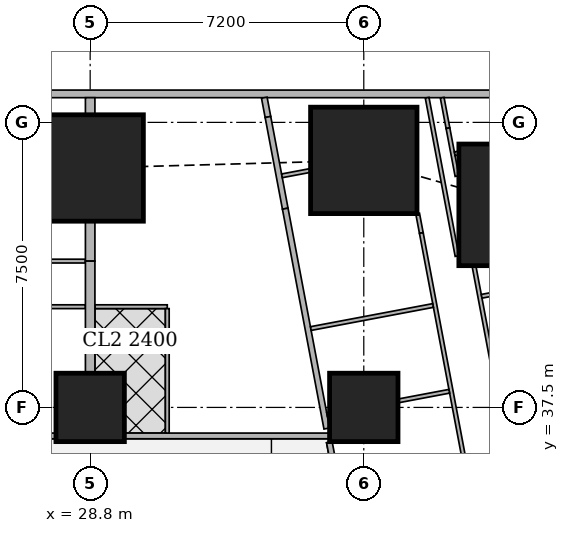
"""IFC4 building model, lengths in metres.
Left out: names, types, materials, properties, quantities, classifications, styles, units other than length and angle.
Written with IfcOpenShell. Run it as: python <this file> out.ifc"""

import sys

from ifc_helpers import new_model, si_unit, direction, frame, frame_2d, origin, origin_2d, place, context, subcontext, project, spatial, rectangle, extrude, element, fill, save


model = new_model("IFC4")
c1 = context("Model", 3, precision=1e-05, world=origin(), true_north=direction((0.0, 1.0)))
c2 = subcontext(c1, "Body", "Model", "MODEL_VIEW")
j1 = project(units=[si_unit("LENGTHUNIT", "METRE"), si_unit("PLANEANGLEUNIT", "RADIAN")], contexts=[c1])
p1 = place(None, origin())
s1 = spatial("IfcSite", under=j1, at=p1, CompositionType="ELEMENT")
p2 = place(p1, origin())
s2 = spatial("IfcBuilding", under=s1, at=p2, CompositionType="ELEMENT")
p3 = place(p2, frame((0.0, 0.0, 53.75)))
s3 = spatial("IfcBuildingStorey", under=s2, at=p3, CompositionType="ELEMENT", Elevation=53.75)
for number, where, z_axis, x_axis in (
    (1, (28.8, 37.5, 0.0), (0.0, 0.0, 1.0), (1.0, 0.0, 0.0)),
    (2, (36.0, 37.5, 0.0), (0.0, 0.0, 1.0), (1.0, 0.0, 0.0)),
):
    element("IfcColumn", number, at=place(p3, frame(where, z_axis=z_axis, x_axis=x_axis)), inside=s3, PredefinedType="COLUMN", context=c2, shape_type="SweptSolid", body=[
        extrude(rectangle(XDim=1.8, YDim=1.8, at=origin_2d()), origin(), (0.0, 0.0, 1.0), 3.75),
    ])
p4 = place(p3, frame((40.102, 42.83, 0.0), z_axis=(0.0, 0.0, 1.0), x_axis=(1.0, 0.0, 0.0)))
e3 = element("IfcColumn", 3, at=p4, inside=s3, PredefinedType="COLUMN", context=c2, shape_type="SweptSolid", body=[
    extrude(rectangle(XDim=3.2, YDim=3.2, at=origin_2d()), origin(), (0.0, 0.0, 1.0), 3.75),
])
for number, where, z_axis, x_axis in (
    (4, (28.8, 43.8, 0.0), (0.0, 0.0, 1.0), (1.0, 0.0, 0.0)),
    (5, (36.0, 44.0, 0.0), (0.0, 0.0, 1.0), (1.0, 0.0, 0.0)),
):
    element("IfcColumn", number, at=place(p3, frame(where, z_axis=z_axis, x_axis=x_axis)), inside=s3, PredefinedType="COLUMN", context=c2, shape_type="SweptSolid", body=[
        extrude(rectangle(XDim=2.8, YDim=2.8, at=origin_2d()), origin(), (0.0, 0.0, 1.0), 3.75),
    ])
p5 = place(p3, frame((40.106, 45.75, 0.0), z_axis=(0.0, 0.0, 1.0), x_axis=(-1.0, 0.0, 0.0)))
e6 = element("IfcWall", 6, at=p5, inside=s3, PredefinedType="SOLIDWALL", context=c2, shape_type="SweptSolid", body=[
    extrude(rectangle(XDim=37.943, YDim=0.2, at=frame_2d((18.971, 0.0))), origin(), (0.0, 0.0, 1.0), 3.5),
])
p6 = place(p5, frame((8.606, 0.0, 0.9)))
e7 = element("IfcOpeningElement", 7, at=p6, cuts=e6, PredefinedType="OPENING", context=c2, shape_type="SweptSolid", body=[
    extrude(rectangle(XDim=1.8, YDim=1.5, at=frame_2d((0.9, 0.75))), frame((0.0, 0.11, 0.0), z_axis=(0.0, -1.0, 0.0), x_axis=(1.0, 0.0, 0.0)), (0.0, 0.0, 1.0), 0.22),
])
p7 = place(p5, frame((12.206, 0.0, 0.9)))
e8 = element("IfcOpeningElement", 8, at=p7, cuts=e6, PredefinedType="OPENING", context=c2, shape_type="SweptSolid", body=[
    extrude(rectangle(XDim=1.8, YDim=1.5, at=frame_2d((0.9, 0.75))), frame((0.0, 0.11, 0.0), z_axis=(0.0, -1.0, 0.0), x_axis=(1.0, 0.0, 0.0)), (0.0, 0.0, 1.0), 0.22),
])
p8 = place(p5, frame((15.806, 0.0, 0.9)))
e9 = element("IfcOpeningElement", 9, at=p8, cuts=e6, PredefinedType="OPENING", context=c2, shape_type="SweptSolid", body=[
    extrude(rectangle(XDim=1.8, YDim=1.5, at=frame_2d((0.9, 0.75))), frame((0.0, 0.11, 0.0), z_axis=(0.0, -1.0, 0.0), x_axis=(1.0, 0.0, 0.0)), (0.0, 0.0, 1.0), 0.22),
])
p9 = place(p5, frame((19.406, 0.0, 0.9)))
e10 = element("IfcOpeningElement", 10, at=p9, cuts=e6, PredefinedType="OPENING", context=c2, shape_type="SweptSolid", body=[
    extrude(rectangle(XDim=1.8, YDim=1.5, at=frame_2d((0.9, 0.75))), frame((0.0, 0.11, 0.0), z_axis=(0.0, -1.0, 0.0), x_axis=(1.0, 0.0, 0.0)), (0.0, 0.0, 1.0), 0.22),
])
p10 = place(p5, frame((23.006, 0.0, 0.9)))
e11 = element("IfcOpeningElement", 11, at=p10, cuts=e6, PredefinedType="OPENING", context=c2, shape_type="SweptSolid", body=[
    extrude(rectangle(XDim=1.8, YDim=1.5, at=frame_2d((0.9, 0.75))), frame((0.0, 0.11, 0.0), z_axis=(0.0, -1.0, 0.0), x_axis=(1.0, 0.0, 0.0)), (0.0, 0.0, 1.0), 0.22),
])
p11 = place(p5, frame((26.606, 0.0, 0.9)))
e12 = element("IfcOpeningElement", 12, at=p11, cuts=e6, PredefinedType="OPENING", context=c2, shape_type="SweptSolid", body=[
    extrude(rectangle(XDim=1.8, YDim=1.5, at=frame_2d((0.9, 0.75))), frame((0.0, 0.11, 0.0), z_axis=(0.0, -1.0, 0.0), x_axis=(1.0, 0.0, 0.0)), (0.0, 0.0, 1.0), 0.22),
])
p12 = place(p3, frame((22.501, 36.75, 0.0), z_axis=(0.0, 0.0, 1.0), x_axis=(1.0, 0.0, 0.0)))
e13 = element("IfcWall", 13, at=p12, inside=s3, PredefinedType="SOLIDWALL", context=c2, shape_type="SweptSolid", body=[
    extrude(rectangle(XDim=5.398, YDim=0.15, at=frame_2d((2.699, 0.0))), origin(), (0.0, 0.0, 1.0), 3.5),
])
p13 = place(p3, frame((29.701, 36.75, 0.0), z_axis=(0.0, 0.0, 1.0), x_axis=(1.0, 0.0, 0.0)))
e14 = element("IfcWall", 14, at=p13, inside=s3, PredefinedType="SOLIDWALL", context=c2, shape_type="SweptSolid", body=[
    extrude(rectangle(XDim=5.399, YDim=0.15, at=frame_2d((2.7, 0.0))), origin(), (0.0, 0.0, 1.0), 3.5),
])
p14 = place(p13, frame((2.745, 0.0, 0.0)))
e15 = element("IfcOpeningElement", 15, at=p14, cuts=e14, PredefinedType="OPENING", context=c2, shape_type="SweptSolid", body=[
    extrude(rectangle(XDim=1.0, YDim=2.1, at=frame_2d((0.5, 1.05))), frame((0.0, 0.085, 0.0), z_axis=(0.0, -1.0, 0.0), x_axis=(1.0, 0.0, 0.0)), (0.0, 0.0, 1.0), 0.17),
])
p15 = place(p3, frame((33.382, 45.65, 0.0), z_axis=(0.0, 0.0, 1.0), x_axis=(0.185657456326, -0.982614527122, 0.0)))
e16 = element("IfcWall", 16, at=p15, inside=s3, PredefinedType="SOLIDWALL", context=c2, shape_type="SweptSolid", body=[
    extrude(rectangle(XDim=0.517, YDim=0.15, at=frame_2d((0.258, 0.0))), origin(), (0.0, 0.0, 1.0), 3.5),
])
p16 = place(p3, frame((33.478, 45.142, 0.0), z_axis=(0.0, 0.0, 1.0), x_axis=(0.185393362436, -0.982664388876, 0.0)))
e17 = element("IfcWall", 17, at=p16, inside=s3, PredefinedType="SOLIDWALL", context=c2, shape_type="SweptSolid", body=[
    extrude(rectangle(XDim=2.455, YDim=0.15, at=frame_2d((1.227, 0.0))), origin(), (0.0, 0.0, 1.0), 2.05),
])
p17 = place(p3, frame((33.933, 42.73, 0.0), z_axis=(0.0, 0.0, 1.0), x_axis=(0.185617897238, -0.982622000682, 0.0)))
e18 = element("IfcWall", 18, at=p17, inside=s3, PredefinedType="SOLIDWALL", context=c2, shape_type="SweptSolid", body=[
    extrude(rectangle(XDim=5.887, YDim=0.15, at=frame_2d((2.944, 0.0))), origin(), (0.0, 0.0, 1.0), 3.5),
])
p18 = place(p3, frame((35.094, 36.585, 0.0), z_axis=(0.0, 0.0, 1.0), x_axis=(0.185588860311, -0.982627485331, 0.0)))
e19 = element("IfcWall", 19, at=p18, inside=s3, PredefinedType="SOLIDWALL", context=c2, shape_type="SweptSolid", body=[
    extrude(rectangle(XDim=34.797, YDim=0.15, at=frame_2d((17.399, 0.0))), origin(), (0.0, 0.0, 1.0), 2.5),
])
p19 = place(p18, frame((9.828, 0.0, 0.0)))
e20 = element("IfcOpeningElement", 20, at=p19, cuts=e19, PredefinedType="OPENING", context=c2, shape_type="SweptSolid", body=[
    extrude(rectangle(XDim=1.0, YDim=2.1, at=frame_2d((0.5, 1.05))), frame((0.0, 0.085, 0.0), z_axis=(0.0, -1.0, 0.0), x_axis=(1.0, 0.0, 0.0)), (0.0, 0.0, 1.0), 0.17),
])
p20 = place(p18, frame((13.645, 0.0, 0.0)))
e21 = element("IfcOpeningElement", 21, at=p20, cuts=e19, PredefinedType="OPENING", context=c2, shape_type="SweptSolid", body=[
    extrude(rectangle(XDim=1.0, YDim=2.1, at=frame_2d((0.5, 1.05))), frame((0.0, 0.085, 0.0), z_axis=(0.0, -1.0, 0.0), x_axis=(1.0, 0.0, 0.0)), (0.0, 0.0, 1.0), 0.17),
])
p21 = place(p18, frame((25.9, 0.0, 0.0)))
e22 = element("IfcOpeningElement", 22, at=p21, cuts=e19, PredefinedType="OPENING", context=c2, shape_type="SweptSolid", body=[
    extrude(rectangle(XDim=1.0, YDim=2.1, at=frame_2d((0.5, 1.05))), frame((0.0, 0.085, 0.0), z_axis=(0.0, -1.0, 0.0), x_axis=(1.0, 0.0, 0.0)), (0.0, 0.0, 1.0), 0.17),
])
p22 = place(p3, frame((38.454, 41.483, 0.0), z_axis=(0.0, 0.0, 1.0), x_axis=(-0.185609245326, 0.982623634994, 0.0)))
e23 = element("IfcWall", 23, at=p22, inside=s3, PredefinedType="PARTITIONING", context=c2, shape_type="SweptSolid", body=[
    extrude(rectangle(XDim=4.241, YDim=0.1, at=frame_2d((2.12, 0.0))), origin(), (0.0, 0.0, 1.0), 2.05),
])
p23 = place(p3, frame((38.063, 45.65, 0.0), z_axis=(0.0, 0.0, 1.0), x_axis=(0.186109918919, -0.982528929895, 0.0)))
e24 = element("IfcWall", 24, at=p23, inside=s3, PredefinedType="PARTITIONING", context=c2, shape_type="SweptSolid", body=[
    extrude(rectangle(XDim=0.817, YDim=0.1, at=frame_2d((0.409, 0.0))), origin(), (0.0, 0.0, 1.0), 3.5),
])
p24 = place(p3, frame((38.215, 44.847, 0.0), z_axis=(0.0, 0.0, 1.0), x_axis=(0.185449486507, -0.982653798626, 0.0)))
e25 = element("IfcWall", 25, at=p24, inside=s3, PredefinedType="PARTITIONING", context=c2, shape_type="SweptSolid", body=[
    extrude(rectangle(XDim=1.282, YDim=0.1, at=frame_2d((0.641, 0.0))), origin(), (0.0, 0.0, 1.0), 2.05),
])
p25 = place(p3, frame((38.9, 41.22, 0.0), z_axis=(0.0, 0.0, 1.0), x_axis=(0.185521843026, -0.98264014052, 0.0)))
e26 = element("IfcWall", 26, at=p25, inside=s3, PredefinedType="PARTITIONING", context=c2, shape_type="SweptSolid", body=[
    extrude(rectangle(XDim=12.058, YDim=0.1, at=frame_2d((6.029, 0.0))), origin(), (0.0, 0.0, 1.0), 2.5),
])
p26 = place(p25, frame((9.55, 0.0, 0.0)))
e27 = element("IfcOpeningElement", 27, at=p26, cuts=e26, PredefinedType="OPENING", context=c2, shape_type="SweptSolid", body=[
    extrude(rectangle(XDim=0.9, YDim=2.1, at=frame_2d((0.45, 1.05))), frame((0.0, 0.06, 0.0), z_axis=(0.0, -1.0, 0.0), x_axis=(1.0, 0.0, 0.0)), (0.0, 0.0, 1.0), 0.12),
])
p27 = place(p25, frame((7.352, 0.0, 0.0)))
e28 = element("IfcOpeningElement", 28, at=p27, cuts=e26, PredefinedType="OPENING", context=c2, shape_type="SweptSolid", body=[
    extrude(rectangle(XDim=0.9, YDim=2.1, at=frame_2d((0.45, 1.05))), frame((0.0, 0.06, 0.0), z_axis=(0.0, -1.0, 0.0), x_axis=(1.0, 0.0, 0.0)), (0.0, 0.0, 1.0), 0.12),
])
p28 = place(p25, frame((1.9, 0.0, 0.0)))
e29 = element("IfcOpeningElement", 29, at=p28, cuts=e26, PredefinedType="OPENING", context=c2, shape_type="SweptSolid", body=[
    extrude(rectangle(XDim=0.9, YDim=2.1, at=frame_2d((0.45, 1.05))), frame((0.0, 0.06, 0.0), z_axis=(0.0, -1.0, 0.0), x_axis=(1.0, 0.0, 0.0)), (0.0, 0.0, 1.0), 0.12),
])
p29 = place(p3, frame((37.417, 42.602, 0.0), z_axis=(0.0, 0.0, 1.0), x_axis=(0.185672001976, -0.982611778721, 0.0)))
e30 = element("IfcWall", 30, at=p29, inside=s3, PredefinedType="PARTITIONING", context=c2, shape_type="SweptSolid", body=[
    extrude(rectangle(XDim=0.522, YDim=0.1, at=frame_2d((0.261, 0.0))), origin(), (0.0, 0.0, 1.0), 2.05),
])
p30 = place(p3, frame((37.514, 42.089, 0.0), z_axis=(0.0, 0.0, 1.0), x_axis=(0.1856087397, -0.982623730503, 0.0)))
e31 = element("IfcWall", 31, at=p30, inside=s3, PredefinedType="PARTITIONING", context=c2, shape_type="SweptSolid", body=[
    extrude(rectangle(XDim=13.33, YDim=0.1, at=frame_2d((6.665, 0.0))), origin(), (0.0, 0.0, 1.0), 2.5),
])
p31 = place(p30, frame((11.825, 0.0, 0.0)))
e32 = element("IfcOpeningElement", 32, at=p31, cuts=e31, PredefinedType="OPENING", context=c2, shape_type="SweptSolid", body=[
    extrude(rectangle(XDim=0.9, YDim=2.1, at=frame_2d((0.45, 1.05))), frame((0.0, 0.06, 0.0), z_axis=(0.0, -1.0, 0.0), x_axis=(1.0, 0.0, 0.0)), (0.0, 0.0, 1.0), 0.12),
])
p32 = place(p30, frame((8.203, 0.0, 0.0)))
e33 = element("IfcOpeningElement", 33, at=p32, cuts=e31, PredefinedType="OPENING", context=c2, shape_type="SweptSolid", body=[
    extrude(rectangle(XDim=0.9, YDim=2.1, at=frame_2d((0.45, 1.05))), frame((0.0, 0.06, 0.0), z_axis=(0.0, -1.0, 0.0), x_axis=(1.0, 0.0, 0.0)), (0.0, 0.0, 1.0), 0.12),
])
p33 = place(p30, frame((2.63, 0.0, 0.0)))
e34 = element("IfcOpeningElement", 34, at=p33, cuts=e31, PredefinedType="OPENING", context=c2, shape_type="SweptSolid", body=[
    extrude(rectangle(XDim=0.9, YDim=2.1, at=frame_2d((0.45, 1.05))), frame((0.0, 0.06, 0.0), z_axis=(0.0, -1.0, 0.0), x_axis=(1.0, 0.0, 0.0)), (0.0, 0.0, 1.0), 0.12),
])
p34 = place(p30, frame((9.916, 0.0, 0.0)))
e35 = element("IfcOpeningElement", 35, at=p34, cuts=e31, PredefinedType="OPENING", context=c2, shape_type="SweptSolid", body=[
    extrude(rectangle(XDim=0.9, YDim=2.1, at=frame_2d((0.45, 1.05))), frame((0.0, 0.06, 0.0), z_axis=(0.0, -1.0, 0.0), x_axis=(1.0, 0.0, 0.0)), (0.0, 0.0, 1.0), 0.12),
])
p35 = place(p30, frame((5.535, 0.0, 0.0)))
e36 = element("IfcOpeningElement", 36, at=p35, cuts=e31, PredefinedType="OPENING", context=c2, shape_type="SweptSolid", body=[
    extrude(rectangle(XDim=0.9, YDim=2.1, at=frame_2d((0.45, 1.05))), frame((0.0, 0.06, 0.0), z_axis=(0.0, -1.0, 0.0), x_axis=(1.0, 0.0, 0.0)), (0.0, 0.0, 1.0), 0.12),
])
p36 = place(p3, frame((38.492, 44.193, 0.0), z_axis=(0.0, 0.0, 1.0), x_axis=(-0.981954528773, -0.189117168504, 0.0)))
e37 = element("IfcWall", 37, at=p36, inside=s3, PredefinedType="PARTITIONING", context=c2, shape_type="SweptSolid", body=[
    extrude(rectangle(XDim=0.101, YDim=0.1, at=frame_2d((0.05, 0.0))), origin(), (0.0, 0.0, 1.0), 2.05),
])
p37 = place(p3, frame((43.277, 41.212, 0.0), z_axis=(0.0, 0.0, 1.0), x_axis=(-0.982665405803, -0.185387972203, 0.0)))
e38 = element("IfcWall", 38, at=p37, inside=s3, PredefinedType="PARTITIONING", context=c2, shape_type="SweptSolid", body=[
    extrude(rectangle(XDim=4.25, YDim=0.1, at=frame_2d((2.125, 0.0))), origin(), (0.0, 0.0, 1.0), 2.05),
])
p38 = place(p3, frame((34.59, 43.734, 0.0), z_axis=(0.0, 0.0, 1.0), x_axis=(-0.98274036184, -0.184990219229, 0.0)))
e39 = element("IfcWall", 39, at=p38, inside=s3, PredefinedType="PARTITIONING", context=c2, shape_type="SweptSolid", body=[
    extrude(rectangle(XDim=0.756, YDim=0.1, at=frame_2d((0.378, 0.0))), origin(), (0.0, 0.0, 1.0), 2.05),
])
p39 = place(p3, frame((37.823, 40.182, 0.0), z_axis=(0.0, 0.0, 1.0), x_axis=(-0.982664729897, -0.18539155487, 0.0)))
e40 = element("IfcWall", 40, at=p39, inside=s3, PredefinedType="PARTITIONING", context=c2, shape_type="SweptSolid", body=[
    extrude(rectangle(XDim=3.274, YDim=0.1, at=frame_2d((1.637, 0.0))), origin(), (0.0, 0.0, 1.0), 3.5),
])
p40 = place(p3, frame((38.25, 37.925, 0.0), z_axis=(0.0, 0.0, 1.0), x_axis=(-0.982650574676, -0.185466568658, 0.0)))
e41 = element("IfcWall", 41, at=p40, inside=s3, PredefinedType="PARTITIONING", context=c2, shape_type="SweptSolid", body=[
    extrude(rectangle(XDim=1.364, YDim=0.1, at=frame_2d((0.682, 0.0))), origin(), (0.0, 0.0, 1.0), 3.5),
])
p41 = place(p3, frame((35.09, 37.328, 0.0), z_axis=(0.0, 0.0, 1.0), x_axis=(-0.982590620415, -0.185783940835, 0.0)))
e42 = element("IfcWall", 42, at=p41, inside=s3, PredefinedType="PARTITIONING", context=c2, shape_type="SweptSolid", body=[
    extrude(rectangle(XDim=0.059, YDim=0.1, at=frame_2d((0.03, 0.0))), origin(), (0.0, 0.0, 1.0), 3.5),
])
p42 = place(p3, frame((21.6, 41.35, 0.0), z_axis=(0.0, 0.0, 1.0), x_axis=(1.0, 0.0, 0.0)))
e43 = element("IfcWall", 43, at=p42, inside=s3, PredefinedType="PARTITIONING", context=c2, shape_type="SweptSolid", body=[
    extrude(rectangle(XDim=7.075, YDim=0.1, at=frame_2d((3.538, 0.0))), origin(), (0.0, 0.0, 1.0), 3.5),
])
p43 = place(p42, frame((1.45, 0.0, 0.0)))
e44 = element("IfcOpeningElement", 44, at=p43, cuts=e43, PredefinedType="OPENING", context=c2, shape_type="SweptSolid", body=[
    extrude(rectangle(XDim=0.9, YDim=2.1, at=frame_2d((0.45, 1.05))), frame((0.0, 0.06, 0.0), z_axis=(0.0, -1.0, 0.0), x_axis=(1.0, 0.0, 0.0)), (0.0, 0.0, 1.0), 0.12),
])
p44 = place(p42, frame((3.8, 0.0, 0.0)))
e45 = element("IfcOpeningElement", 45, at=p44, cuts=e43, PredefinedType="OPENING", context=c2, shape_type="SweptSolid", body=[
    extrude(rectangle(XDim=0.9, YDim=2.1, at=frame_2d((0.45, 1.05))), frame((0.0, 0.06, 0.0), z_axis=(0.0, -1.0, 0.0), x_axis=(1.0, 0.0, 0.0)), (0.0, 0.0, 1.0), 0.12),
])
p45 = place(p3, frame((21.6, 40.15, 0.0), z_axis=(0.0, 0.0, 1.0), x_axis=(1.0, 0.0, 0.0)))
e46 = element("IfcWall", 46, at=p45, inside=s3, PredefinedType="PARTITIONING", context=c2, shape_type="SweptSolid", body=[
    extrude(rectangle(XDim=7.075, YDim=0.1, at=frame_2d((3.538, 0.0))), origin(), (0.0, 0.0, 1.0), 3.5),
])
p46 = place(p45, frame((0.655, 0.0, 0.0)))
e47 = element("IfcOpeningElement", 47, at=p46, cuts=e46, PredefinedType="OPENING", context=c2, shape_type="SweptSolid", body=[
    extrude(rectangle(XDim=0.9, YDim=2.1, at=frame_2d((0.45, 1.05))), frame((0.0, 0.06, 0.0), z_axis=(0.0, -1.0, 0.0), x_axis=(1.0, 0.0, 0.0)), (0.0, 0.0, 1.0), 0.12),
])
p47 = place(p45, frame((3.95, 0.0, 0.0)))
e48 = element("IfcOpeningElement", 48, at=p47, cuts=e46, PredefinedType="OPENING", context=c2, shape_type="SweptSolid", body=[
    extrude(rectangle(XDim=0.9, YDim=2.1, at=frame_2d((0.45, 1.05))), frame((0.0, 0.06, 0.0), z_axis=(0.0, -1.0, 0.0), x_axis=(1.0, 0.0, 0.0)), (0.0, 0.0, 1.0), 0.12),
])
p48 = place(p45, frame((2.455, 0.0, 0.0)))
e49 = element("IfcOpeningElement", 49, at=p48, cuts=e46, PredefinedType="OPENING", context=c2, shape_type="SweptSolid", body=[
    extrude(rectangle(XDim=0.9, YDim=2.1, at=frame_2d((0.45, 1.05))), frame((0.0, 0.06, 0.0), z_axis=(0.0, -1.0, 0.0), x_axis=(1.0, 0.0, 0.0)), (0.0, 0.0, 1.0), 0.12),
])
p49 = place(p45, frame((5.75, 0.0, 0.0)))
e50 = element("IfcOpeningElement", 50, at=p49, cuts=e46, PredefinedType="OPENING", context=c2, shape_type="SweptSolid", body=[
    extrude(rectangle(XDim=0.9, YDim=2.1, at=frame_2d((0.45, 1.05))), frame((0.0, 0.06, 0.0), z_axis=(0.0, -1.0, 0.0), x_axis=(1.0, 0.0, 0.0)), (0.0, 0.0, 1.0), 0.12),
])
p50 = place(p3, frame((28.925, 40.15, 0.0), z_axis=(0.0, 0.0, 1.0), x_axis=(1.0, 0.0, 0.0)))
e51 = element("IfcWall", 51, at=p50, inside=s3, PredefinedType="PARTITIONING", context=c2, shape_type="SweptSolid", body=[
    extrude(rectangle(XDim=1.904, YDim=0.1, at=frame_2d((0.952, 0.0))), origin(), (0.0, 0.0, 1.0), 3.5),
])
p51 = place(p50, frame((0.425, 0.0, 0.0)))
e52 = element("IfcOpeningElement", 52, at=p51, cuts=e51, PredefinedType="OPENING", context=c2, shape_type="SweptSolid", body=[
    extrude(rectangle(XDim=0.9, YDim=2.1, at=frame_2d((0.45, 1.05))), frame((0.0, 0.06, 0.0), z_axis=(0.0, -1.0, 0.0), x_axis=(1.0, 0.0, 0.0)), (0.0, 0.0, 1.0), 0.12),
])
p52 = place(p3, frame((30.829, 36.825, 0.0), z_axis=(0.0, 0.0, 1.0), x_axis=(0.0, 1.0, 0.0)))
e53 = element("IfcWall", 53, at=p52, inside=s3, PredefinedType="PARTITIONING", context=c2, shape_type="SweptSolid", body=[
    extrude(rectangle(XDim=3.275, YDim=0.1, at=frame_2d((1.638, 0.0))), origin(), (0.0, 0.0, 1.0), 3.5),
])
p53 = place(p3, frame((28.8, 41.35, 0.0), z_axis=(0.0, 0.0, 1.0), x_axis=(0.0, 1.0, 0.0)))
e54 = element("IfcWall", 54, at=p53, inside=s3, PredefinedType="SOLIDWALL", context=c2, shape_type="SweptSolid", body=[
    extrude(rectangle(XDim=1.049, YDim=0.25, at=frame_2d((0.524, 0.0))), origin(), (0.0, 0.0, 1.0), 3.5),
])
p54 = place(p3, frame((28.8, 45.201, 0.0), z_axis=(0.0, 0.0, 1.0), x_axis=(0.0, 1.0, 0.0)))
e55 = element("IfcWall", 55, at=p54, inside=s3, PredefinedType="SOLIDWALL", context=c2, shape_type="SweptSolid", body=[
    extrude(rectangle(XDim=0.449, YDim=0.25, at=frame_2d((0.225, 0.0))), origin(), (0.0, 0.0, 1.0), 3.5),
])
p55 = place(p3, frame((28.8, 38.401, 0.0), z_axis=(0.0, 0.0, 1.0), x_axis=(0.0, 1.0, 0.0)))
e56 = element("IfcWall", 56, at=p55, inside=s3, PredefinedType="SOLIDWALL", context=c2, shape_type="SweptSolid", body=[
    extrude(rectangle(XDim=2.949, YDim=0.25, at=frame_2d((1.475, 0.0))), origin(), (0.0, 0.0, 1.0), 3.5),
])
p56 = place(p6, origin())
e57 = element("IfcWindow", 57, at=p56, inside=s3, PartitioningType="SINGLE_PANEL", PredefinedType="WINDOW", context=c2, shape_type="SweptSolid", body=[
    extrude(rectangle(XDim=1.8, YDim=1.5, at=frame_2d((0.9, 0.75))), frame((0.0, 0.03, 0.0), z_axis=(0.0, -1.0, 0.0), x_axis=(1.0, 0.0, 0.0)), (0.0, 0.0, 1.0), 0.06),
])
fill(e7, e57)
p57 = place(p7, origin())
e58 = element("IfcWindow", 58, at=p57, inside=s3, PartitioningType="SINGLE_PANEL", PredefinedType="WINDOW", context=c2, shape_type="SweptSolid", body=[
    extrude(rectangle(XDim=1.8, YDim=1.5, at=frame_2d((0.9, 0.75))), frame((0.0, 0.03, 0.0), z_axis=(0.0, -1.0, 0.0), x_axis=(1.0, 0.0, 0.0)), (0.0, 0.0, 1.0), 0.06),
])
fill(e8, e58)
p58 = place(p28, origin())
e59 = element("IfcDoor", 59, at=p58, inside=s3, OperationType="SINGLE_SWING_LEFT", PredefinedType="DOOR", context=c2, shape_type="SweptSolid", body=[
    extrude(rectangle(XDim=0.9, YDim=2.1, at=frame_2d((0.45, 1.05))), frame((0.0, 0.025, 0.0), z_axis=(0.0, -1.0, 0.0), x_axis=(1.0, 0.0, 0.0)), (0.0, 0.0, 1.0), 0.05),
])
fill(e29, e59)
p59 = place(p33, origin())
e60 = element("IfcDoor", 60, at=p59, inside=s3, OperationType="SINGLE_SWING_LEFT", PredefinedType="DOOR", context=c2, shape_type="SweptSolid", body=[
    extrude(rectangle(XDim=0.9, YDim=2.1, at=frame_2d((0.45, 1.05))), frame((0.0, 0.025, 0.0), z_axis=(0.0, -1.0, 0.0), x_axis=(1.0, 0.0, 0.0)), (0.0, 0.0, 1.0), 0.05),
])
fill(e34, e60)
p60 = place(p35, origin())
e61 = element("IfcDoor", 61, at=p60, inside=s3, OperationType="SINGLE_SWING_RIGHT", PredefinedType="DOOR", context=c2, shape_type="SweptSolid", body=[
    extrude(rectangle(XDim=0.9, YDim=2.1, at=frame_2d((0.45, 1.05))), frame((0.0, 0.025, 0.0), z_axis=(0.0, -1.0, 0.0), x_axis=(1.0, 0.0, 0.0)), (0.0, 0.0, 1.0), 0.05),
])
fill(e36, e61)
p61 = place(p49, origin())
e62 = element("IfcDoor", 62, at=p61, inside=s3, OperationType="SINGLE_SWING_LEFT", PredefinedType="DOOR", context=c2, shape_type="SweptSolid", body=[
    extrude(rectangle(XDim=0.9, YDim=2.1, at=frame_2d((0.45, 1.05))), frame((0.0, 0.025, 0.0), z_axis=(0.0, -1.0, 0.0), x_axis=(1.0, 0.0, 0.0)), (0.0, 0.0, 1.0), 0.05),
])
fill(e50, e62)
p62 = place(p51, origin())
e63 = element("IfcDoor", 63, at=p62, inside=s3, OperationType="SINGLE_SWING_RIGHT", PredefinedType="DOOR", context=c2, shape_type="SweptSolid", body=[
    extrude(rectangle(XDim=0.9, YDim=2.1, at=frame_2d((0.45, 1.05))), frame((0.0, 0.025, 0.0), z_axis=(0.0, -1.0, 0.0), x_axis=(1.0, 0.0, 0.0)), (0.0, 0.0, 1.0), 0.05),
])
fill(e52, e63)
p63 = place(p14, origin())
e64 = element("IfcDoor", 64, at=p63, inside=s3, OperationType="SINGLE_SWING_RIGHT", PredefinedType="DOOR", context=c2, shape_type="SweptSolid", body=[
    extrude(rectangle(XDim=1.0, YDim=2.1, at=frame_2d((0.5, 1.05))), frame((0.0, 0.025, 0.0), z_axis=(0.0, -1.0, 0.0), x_axis=(1.0, 0.0, 0.0)), (0.0, 0.0, 1.0), 0.05),
])
fill(e15, e64)
save(model, sys.argv[1])
